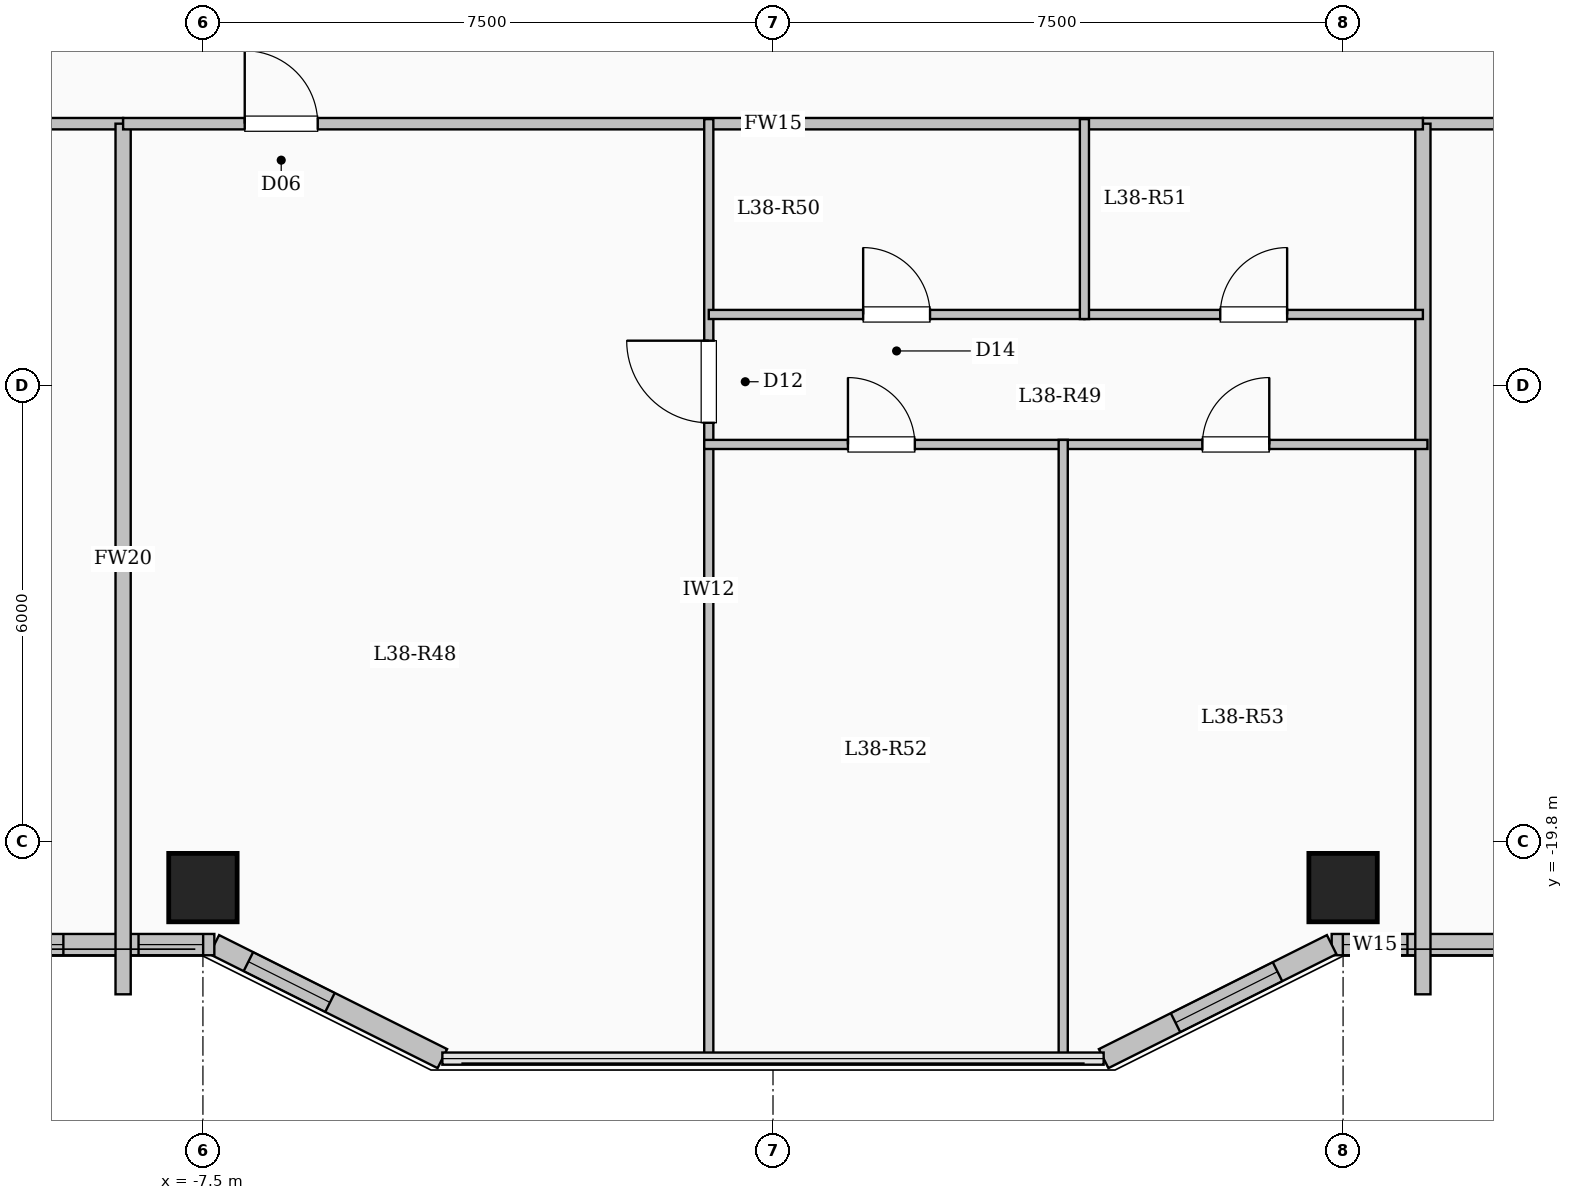
"""IFC4 building model, lengths in metres.
Left out: names, types, materials, properties, quantities, classifications, styles, units other than length and angle.
Written with IfcOpenShell. Run it as: python <this file> out.ifc"""

import sys

from ifc_helpers import new_model, si_unit, direction, frame, frame_2d, origin, origin_2d, place, context, subcontext, project, spatial, rectangle, extrude, element, fill, save


model = new_model("IFC4")
c1 = context("Model", 3, precision=1e-05, world=origin(), true_north=direction((0.0, 1.0)))
c2 = subcontext(c1, "Body", "Model", "MODEL_VIEW")
j1 = project(units=[si_unit("LENGTHUNIT", "METRE"), si_unit("PLANEANGLEUNIT", "RADIAN")], contexts=[c1])
p1 = place(None, origin())
s1 = spatial("IfcSite", under=j1, at=p1, CompositionType="ELEMENT")
p2 = place(p1, origin())
s2 = spatial("IfcBuilding", under=s1, at=p2, CompositionType="ELEMENT")
p3 = place(p2, frame((0.0, 0.0, 142.65)))
s3 = spatial("IfcBuildingStorey", under=s2, at=p3, CompositionType="ELEMENT", Elevation=142.65)
for number, where, z_axis, x_axis in (
    (1, (-7.5, -20.4, 0.0), (0.0, 0.0, 1.0), (1.0, 0.0, 0.0)),
    (2, (7.5, -20.4, 0.0), (0.0, 0.0, 1.0), (1.0, 0.0, 0.0)),
):
    element("IfcColumn", number, at=place(p3, frame(where, z_axis=z_axis, x_axis=x_axis)), inside=s3, PredefinedType="COLUMN", context=c2, shape_type="SweptSolid", body=[
        extrude(rectangle(XDim=0.9, YDim=0.9, at=origin_2d()), origin(), (0.0, 0.0, 1.0), 3.35),
    ])
p4 = place(p3, frame((19.65, -21.15, 0.0), z_axis=(0.0, 0.0, 1.0), x_axis=(-1.0, 0.0, 0.0)))
e3 = element("IfcWall", 3, at=p4, inside=s3, PredefinedType="SOLIDWALL", context=c2, shape_type="SweptSolid", body=[
    extrude(rectangle(XDim=12.3, YDim=0.28, at=frame_2d((6.15, 0.0))), origin(), (0.0, 0.0, 1.0), 3.1),
])
p5 = place(p4, frame((4.321, 0.0, 0.9)))
e4 = element("IfcOpeningElement", 4, at=p5, cuts=e3, PredefinedType="OPENING", context=c2, shape_type="SweptSolid", body=[
    extrude(rectangle(XDim=1.65, YDim=1.6, at=frame_2d((0.825, 0.8))), frame((0.0, 0.15, 0.0), z_axis=(0.0, -1.0, 0.0), x_axis=(1.0, 0.0, 0.0)), (0.0, 0.0, 1.0), 0.3),
])
p6 = place(p4, frame((8.112, 0.0, 0.9)))
e5 = element("IfcOpeningElement", 5, at=p6, cuts=e3, PredefinedType="OPENING", context=c2, shape_type="SweptSolid", body=[
    extrude(rectangle(XDim=2.0, YDim=1.7, at=frame_2d((1.0, 0.85))), frame((0.0, 0.15, 0.0), z_axis=(0.0, -1.0, 0.0), x_axis=(1.0, 0.0, 0.0)), (0.0, 0.0, 1.0), 0.3),
])
p7 = place(p4, frame((11.303, 0.0, 0.95)))
e6 = element("IfcOpeningElement", 6, at=p7, cuts=e3, PredefinedType="OPENING", context=c2, shape_type="SweptSolid", body=[
    extrude(rectangle(XDim=0.85, YDim=1.5, at=frame_2d((0.425, 0.75))), frame((0.0, 0.15, 0.0), z_axis=(0.0, -1.0, 0.0), x_axis=(1.0, 0.0, 0.0)), (0.0, 0.0, 1.0), 0.3),
])
p8 = place(p3, frame((7.35, -21.15, 0.0), z_axis=(0.0, 0.0, 1.0), x_axis=(-0.894427191, -0.4472135955, 0.0)))
e7 = element("IfcWall", 7, at=p8, inside=s3, PredefinedType="SOLIDWALL", context=c2, shape_type="SweptSolid", body=[
    extrude(rectangle(XDim=3.354, YDim=0.28, at=frame_2d((1.677, 0.0))), origin(), (0.0, 0.0, 1.0), 3.1),
])
p9 = place(p8, frame((0.797, 0.0, 0.9)))
e8 = element("IfcOpeningElement", 8, at=p9, cuts=e7, PredefinedType="OPENING", context=c2, shape_type="SweptSolid", body=[
    extrude(rectangle(XDim=1.5, YDim=1.65, at=frame_2d((0.75, 0.825))), frame((0.0, 0.15, 0.0), z_axis=(0.0, -1.0, 0.0), x_axis=(1.0, 0.0, 0.0)), (0.0, 0.0, 1.0), 0.3),
])
p10 = place(p3, frame((-4.35, -22.65, 0.0), z_axis=(0.0, 0.0, 1.0), x_axis=(-0.894427191, 0.4472135955, 0.0)))
e9 = element("IfcWall", 9, at=p10, inside=s3, PredefinedType="SOLIDWALL", context=c2, shape_type="SweptSolid", body=[
    extrude(rectangle(XDim=3.354, YDim=0.28, at=frame_2d((1.677, 0.0))), origin(), (0.0, 0.0, 1.0), 3.1),
])
p11 = place(p10, frame((1.653, 0.0, 0.95)))
e10 = element("IfcOpeningElement", 10, at=p11, cuts=e9, PredefinedType="OPENING", context=c2, shape_type="SweptSolid", body=[
    extrude(rectangle(XDim=1.2, YDim=1.5, at=frame_2d((0.6, 0.75))), frame((0.0, 0.15, 0.0), z_axis=(0.0, -1.0, 0.0), x_axis=(1.0, 0.0, 0.0)), (0.0, 0.0, 1.0), 0.3),
])
p12 = place(p3, frame((-7.35, -21.15, 0.0), z_axis=(0.0, 0.0, 1.0), x_axis=(-1.0, 0.0, 0.0)))
e11 = element("IfcWall", 11, at=p12, inside=s3, PredefinedType="SOLIDWALL", context=c2, shape_type="SweptSolid", body=[
    extrude(rectangle(XDim=12.3, YDim=0.28, at=frame_2d((6.15, 0.0))), origin(), (0.0, 0.0, 1.0), 3.1),
])
p13 = place(p12, frame((0.147, 0.0, 0.95)))
e12 = element("IfcOpeningElement", 12, at=p13, cuts=e11, PredefinedType="OPENING", context=c2, shape_type="SweptSolid", body=[
    extrude(rectangle(XDim=0.85, YDim=1.5, at=frame_2d((0.425, 0.75))), frame((0.0, 0.15, 0.0), z_axis=(0.0, -1.0, 0.0), x_axis=(1.0, 0.0, 0.0)), (0.0, 0.0, 1.0), 0.3),
])
p14 = place(p12, frame((1.986, 0.0, 0.9)))
e13 = element("IfcOpeningElement", 13, at=p14, cuts=e11, PredefinedType="OPENING", context=c2, shape_type="SweptSolid", body=[
    extrude(rectangle(XDim=1.5, YDim=1.65, at=frame_2d((0.75, 0.825))), frame((0.0, 0.15, 0.0), z_axis=(0.0, -1.0, 0.0), x_axis=(1.0, 0.0, 0.0)), (0.0, 0.0, 1.0), 0.3),
])
p15 = place(p12, frame((5.275, 0.0, 0.9)))
e14 = element("IfcOpeningElement", 14, at=p15, cuts=e11, PredefinedType="OPENING", context=c2, shape_type="SweptSolid", body=[
    extrude(rectangle(XDim=2.0, YDim=1.7, at=frame_2d((1.0, 0.85))), frame((0.0, 0.15, 0.0), z_axis=(0.0, -1.0, 0.0), x_axis=(1.0, 0.0, 0.0)), (0.0, 0.0, 1.0), 0.3),
])
p16 = place(p12, frame((9.267, 0.0, 0.9)))
e15 = element("IfcOpeningElement", 15, at=p16, cuts=e11, PredefinedType="OPENING", context=c2, shape_type="SweptSolid", body=[
    extrude(rectangle(XDim=2.0, YDim=1.7, at=frame_2d((1.0, 0.85))), frame((0.0, 0.15, 0.0), z_axis=(0.0, -1.0, 0.0), x_axis=(1.0, 0.0, 0.0)), (0.0, 0.0, 1.0), 0.3),
])
p17 = place(p3, frame((-19.55, -10.35, 0.0), z_axis=(0.0, 0.0, 1.0), x_axis=(1.0, 0.0, 0.0)))
e16 = element("IfcWall", 16, at=p17, inside=s3, PredefinedType="PARTITIONING", context=c2, shape_type="SweptSolid", body=[
    extrude(rectangle(XDim=11.0, YDim=0.15, at=frame_2d((5.5, 0.0))), origin(), (0.0, 0.0, 1.0), 3.1),
])
p18 = place(p17, frame((1.466, 0.0, 0.0)))
e17 = element("IfcOpeningElement", 17, at=p18, cuts=e16, PredefinedType="OPENING", context=c2, shape_type="SweptSolid", body=[
    extrude(rectangle(XDim=0.95, YDim=2.15, at=frame_2d((0.475, 1.075))), frame((0.0, 0.085, 0.0), z_axis=(0.0, -1.0, 0.0), x_axis=(1.0, 0.0, 0.0)), (0.0, 0.0, 1.0), 0.17),
])
p19 = place(p17, frame((5.438, 0.0, 0.0)))
e18 = element("IfcOpeningElement", 18, at=p19, cuts=e16, PredefinedType="OPENING", context=c2, shape_type="SweptSolid", body=[
    extrude(rectangle(XDim=0.95, YDim=2.15, at=frame_2d((0.475, 1.075))), frame((0.0, 0.085, 0.0), z_axis=(0.0, -1.0, 0.0), x_axis=(1.0, 0.0, 0.0)), (0.0, 0.0, 1.0), 0.17),
])
p20 = place(p17, frame((8.972, 0.0, 0.0)))
e19 = element("IfcOpeningElement", 19, at=p20, cuts=e16, PredefinedType="OPENING", context=c2, shape_type="SweptSolid", body=[
    extrude(rectangle(XDim=0.95, YDim=2.15, at=frame_2d((0.475, 1.075))), frame((0.0, 0.085, 0.0), z_axis=(0.0, -1.0, 0.0), x_axis=(1.0, 0.0, 0.0)), (0.0, 0.0, 1.0), 0.17),
])
p21 = place(p3, frame((8.55, -10.35, 0.0), z_axis=(0.0, 0.0, 1.0), x_axis=(1.0, 0.0, 0.0)))
e20 = element("IfcWall", 20, at=p21, inside=s3, PredefinedType="PARTITIONING", context=c2, shape_type="SweptSolid", body=[
    extrude(rectangle(XDim=11.0, YDim=0.15, at=frame_2d((5.5, 0.0))), origin(), (0.0, 0.0, 1.0), 3.1),
])
p22 = place(p21, frame((1.516, 0.0, 0.0)))
e21 = element("IfcOpeningElement", 21, at=p22, cuts=e20, PredefinedType="OPENING", context=c2, shape_type="SweptSolid", body=[
    extrude(rectangle(XDim=0.95, YDim=2.15, at=frame_2d((0.475, 1.075))), frame((0.0, 0.085, 0.0), z_axis=(0.0, -1.0, 0.0), x_axis=(1.0, 0.0, 0.0)), (0.0, 0.0, 1.0), 0.17),
])
p23 = place(p21, frame((5.488, 0.0, 0.0)))
e22 = element("IfcOpeningElement", 22, at=p23, cuts=e20, PredefinedType="OPENING", context=c2, shape_type="SweptSolid", body=[
    extrude(rectangle(XDim=0.95, YDim=2.15, at=frame_2d((0.475, 1.075))), frame((0.0, 0.085, 0.0), z_axis=(0.0, -1.0, 0.0), x_axis=(1.0, 0.0, 0.0)), (0.0, 0.0, 1.0), 0.17),
])
p24 = place(p21, frame((9.022, 0.0, 0.0)))
e23 = element("IfcOpeningElement", 23, at=p24, cuts=e20, PredefinedType="OPENING", context=c2, shape_type="SweptSolid", body=[
    extrude(rectangle(XDim=0.95, YDim=2.15, at=frame_2d((0.475, 1.075))), frame((0.0, 0.085, 0.0), z_axis=(0.0, -1.0, 0.0), x_axis=(1.0, 0.0, 0.0)), (0.0, 0.0, 1.0), 0.17),
])
for number, where, z_axis, x_axis in (
    (24, (-8.55, -21.804, 0.0), (0.0, 0.0, 1.0), (0.0, 1.0, 0.0)),
    (25, (8.55, -21.804, 0.0), (0.0, 0.0, 1.0), (0.0, 1.0, 0.0)),
):
    element("IfcWall", number, at=place(p3, frame(where, z_axis=z_axis, x_axis=x_axis)), inside=s3, PredefinedType="SOLIDWALL", context=c2, shape_type="SweptSolid", body=[
        extrude(rectangle(XDim=11.454, YDim=0.2, at=frame_2d((5.727, 0.0))), origin(), (0.0, 0.0, 1.0), 3.1),
    ])
p25 = place(p3, frame((-8.55, -10.35, 0.0), z_axis=(0.0, 0.0, 1.0), x_axis=(1.0, 0.0, 0.0)))
e26 = element("IfcWall", 26, at=p25, inside=s3, PredefinedType="PARTITIONING", context=c2, shape_type="SweptSolid", body=[
    extrude(rectangle(XDim=17.1, YDim=0.15, at=frame_2d((8.55, 0.0))), origin(), (0.0, 0.0, 1.0), 3.1),
])
p26 = place(p25, frame((1.6, 0.0, 0.0)))
e27 = element("IfcOpeningElement", 27, at=p26, cuts=e26, PredefinedType="OPENING", context=c2, shape_type="SweptSolid", body=[
    extrude(rectangle(XDim=0.96, YDim=2.15, at=frame_2d((0.48, 1.075))), frame((0.0, 0.085, 0.0), z_axis=(0.0, -1.0, 0.0), x_axis=(1.0, 0.0, 0.0)), (0.0, 0.0, 1.0), 0.17),
])
p27 = place(p3, frame((-0.845, -22.68, 0.0), z_axis=(0.0, 0.0, 1.0), x_axis=(0.0, 1.0, 0.0)))
e28 = element("IfcWall", 28, at=p27, inside=s3, PredefinedType="PARTITIONING", context=c2, shape_type="SweptSolid", body=[
    extrude(rectangle(XDim=12.39, YDim=0.12, at=frame_2d((6.195, 0.0))), origin(), (0.0, 0.0, 1.0), 3.1),
])
p28 = place(p27, frame((8.395, 0.0, 0.0)))
e29 = element("IfcOpeningElement", 29, at=p28, cuts=e28, PredefinedType="OPENING", context=c2, shape_type="SweptSolid", body=[
    extrude(rectangle(XDim=1.08, YDim=2.15, at=frame_2d((0.54, 1.075))), frame((0.0, 0.07, 0.0), z_axis=(0.0, -1.0, 0.0), x_axis=(1.0, 0.0, 0.0)), (0.0, 0.0, 1.0), 0.14),
])
p29 = place(p3, frame((-0.845, -12.86, 0.0), z_axis=(0.0, 0.0, 1.0), x_axis=(1.0, 0.0, 0.0)))
e30 = element("IfcWall", 30, at=p29, inside=s3, PredefinedType="PARTITIONING", context=c2, shape_type="SweptSolid", body=[
    extrude(rectangle(XDim=4.942, YDim=0.12, at=frame_2d((2.471, 0.0))), origin(), (0.0, 0.0, 1.0), 3.1),
])
p30 = place(p29, frame((2.031, 0.0, 0.0)))
e31 = element("IfcOpeningElement", 31, at=p30, cuts=e30, PredefinedType="OPENING", context=c2, shape_type="SweptSolid", body=[
    extrude(rectangle(XDim=0.88, YDim=2.1, at=frame_2d((0.44, 1.05))), frame((0.0, 0.07, 0.0), z_axis=(0.0, -1.0, 0.0), x_axis=(1.0, 0.0, 0.0)), (0.0, 0.0, 1.0), 0.14),
])
p31 = place(p3, frame((4.097, -12.86, 0.0), z_axis=(0.0, 0.0, 1.0), x_axis=(1.0, 0.0, 0.0)))
e32 = element("IfcWall", 32, at=p31, inside=s3, PredefinedType="PARTITIONING", context=c2, shape_type="SweptSolid", body=[
    extrude(rectangle(XDim=4.453, YDim=0.12, at=frame_2d((2.227, 0.0))), origin(), (0.0, 0.0, 1.0), 3.1),
])
p32 = place(p31, frame((1.787, 0.0, 0.0)))
e33 = element("IfcOpeningElement", 33, at=p32, cuts=e32, PredefinedType="OPENING", context=c2, shape_type="SweptSolid", body=[
    extrude(rectangle(XDim=0.88, YDim=2.1, at=frame_2d((0.44, 1.05))), frame((0.0, 0.07, 0.0), z_axis=(0.0, -1.0, 0.0), x_axis=(1.0, 0.0, 0.0)), (0.0, 0.0, 1.0), 0.14),
])
p33 = place(p3, frame((-0.905, -14.57, 0.0), z_axis=(0.0, 0.0, 1.0), x_axis=(1.0, 0.0, 0.0)))
e34 = element("IfcWall", 34, at=p33, inside=s3, PredefinedType="PARTITIONING", context=c2, shape_type="SweptSolid", body=[
    extrude(rectangle(XDim=9.515, YDim=0.12, at=frame_2d((4.758, 0.0))), origin(), (0.0, 0.0, 1.0), 3.1),
])
p34 = place(p33, frame((1.891, 0.0, 0.0)))
e35 = element("IfcOpeningElement", 35, at=p34, cuts=e34, PredefinedType="OPENING", context=c2, shape_type="SweptSolid", body=[
    extrude(rectangle(XDim=0.88, YDim=2.1, at=frame_2d((0.44, 1.05))), frame((0.0, 0.07, 0.0), z_axis=(0.0, -1.0, 0.0), x_axis=(1.0, 0.0, 0.0)), (0.0, 0.0, 1.0), 0.14),
])
p35 = place(p33, frame((6.554, 0.0, 0.0)))
e36 = element("IfcOpeningElement", 36, at=p35, cuts=e34, PredefinedType="OPENING", context=c2, shape_type="SweptSolid", body=[
    extrude(rectangle(XDim=0.88, YDim=2.1, at=frame_2d((0.44, 1.05))), frame((0.0, 0.07, 0.0), z_axis=(0.0, -1.0, 0.0), x_axis=(1.0, 0.0, 0.0)), (0.0, 0.0, 1.0), 0.14),
])
p36 = place(p3, frame((4.097, -12.92, 0.0), z_axis=(0.0, 0.0, 1.0), x_axis=(0.0, 1.0, 0.0)))
e37 = element("IfcWall", 37, at=p36, inside=s3, PredefinedType="PARTITIONING", context=c2, shape_type="SweptSolid", body=[
    extrude(rectangle(XDim=2.63, YDim=0.12, at=frame_2d((1.315, 0.0))), origin(), (0.0, 0.0, 1.0), 3.1),
])
p37 = place(p3, frame((3.818, -22.68, 0.0), z_axis=(0.0, 0.0, 1.0), x_axis=(0.0, 1.0, 0.0)))
e38 = element("IfcWall", 38, at=p37, inside=s3, PredefinedType="PARTITIONING", context=c2, shape_type="SweptSolid", body=[
    extrude(rectangle(XDim=8.17, YDim=0.12, at=frame_2d((4.085, 0.0))), origin(), (0.0, 0.0, 1.0), 3.1),
])
p38 = place(p7, origin())
e39 = element("IfcWindow", 39, at=p38, inside=s3, PartitioningType="SINGLE_PANEL", PredefinedType="WINDOW", context=c2, shape_type="SweptSolid", body=[
    extrude(rectangle(XDim=0.85, YDim=1.5, at=frame_2d((0.425, 0.75))), frame((0.0, 0.03, 0.0), z_axis=(0.0, -1.0, 0.0), x_axis=(1.0, 0.0, 0.0)), (0.0, 0.0, 1.0), 0.06),
])
fill(e6, e39)
p39 = place(p9, origin())
e40 = element("IfcWindow", 40, at=p39, inside=s3, PartitioningType="SINGLE_PANEL", PredefinedType="WINDOW", context=c2, shape_type="SweptSolid", body=[
    extrude(rectangle(XDim=1.5, YDim=1.65, at=frame_2d((0.75, 0.825))), frame((0.0, 0.03, 0.0), z_axis=(0.0, -1.0, 0.0), x_axis=(1.0, 0.0, 0.0)), (0.0, 0.0, 1.0), 0.06),
])
fill(e8, e40)
p40 = place(p11, origin())
e41 = element("IfcWindow", 41, at=p40, inside=s3, PartitioningType="SINGLE_PANEL", PredefinedType="WINDOW", context=c2, shape_type="SweptSolid", body=[
    extrude(rectangle(XDim=1.2, YDim=1.5, at=frame_2d((0.6, 0.75))), frame((0.0, 0.03, 0.0), z_axis=(0.0, -1.0, 0.0), x_axis=(1.0, 0.0, 0.0)), (0.0, 0.0, 1.0), 0.06),
])
fill(e10, e41)
p41 = place(p13, origin())
e42 = element("IfcWindow", 42, at=p41, inside=s3, PartitioningType="SINGLE_PANEL", PredefinedType="WINDOW", context=c2, shape_type="SweptSolid", body=[
    extrude(rectangle(XDim=0.85, YDim=1.5, at=frame_2d((0.425, 0.75))), frame((0.0, 0.03, 0.0), z_axis=(0.0, -1.0, 0.0), x_axis=(1.0, 0.0, 0.0)), (0.0, 0.0, 1.0), 0.06),
])
fill(e12, e42)
p42 = place(p14, origin())
e43 = element("IfcWindow", 43, at=p42, inside=s3, PartitioningType="SINGLE_PANEL", PredefinedType="WINDOW", context=c2, shape_type="SweptSolid", body=[
    extrude(rectangle(XDim=1.5, YDim=1.65, at=frame_2d((0.75, 0.825))), frame((0.0, 0.03, 0.0), z_axis=(0.0, -1.0, 0.0), x_axis=(1.0, 0.0, 0.0)), (0.0, 0.0, 1.0), 0.06),
])
fill(e13, e43)
p43 = place(p26, origin())
e44 = element("IfcDoor", 44, at=p43, inside=s3, OperationType="SINGLE_SWING_LEFT", PredefinedType="DOOR", context=c2, shape_type="SweptSolid", body=[
    extrude(rectangle(XDim=0.96, YDim=2.15, at=frame_2d((0.48, 1.075))), frame((0.0, 0.025, 0.0), z_axis=(0.0, -1.0, 0.0), x_axis=(1.0, 0.0, 0.0)), (0.0, 0.0, 1.0), 0.05),
])
fill(e27, e44)
p44 = place(p28, origin())
e45 = element("IfcDoor", 45, at=p44, inside=s3, OperationType="SINGLE_SWING_RIGHT", PredefinedType="DOOR", context=c2, shape_type="SweptSolid", body=[
    extrude(rectangle(XDim=1.08, YDim=2.15, at=frame_2d((0.54, 1.075))), frame((0.0, 0.025, 0.0), z_axis=(0.0, -1.0, 0.0), x_axis=(1.0, 0.0, 0.0)), (0.0, 0.0, 1.0), 0.05),
])
fill(e29, e45)
p45 = place(p30, origin())
e46 = element("IfcDoor", 46, at=p45, inside=s3, OperationType="SINGLE_SWING_LEFT", PredefinedType="DOOR", context=c2, shape_type="SweptSolid", body=[
    extrude(rectangle(XDim=0.88, YDim=2.1, at=frame_2d((0.44, 1.05))), frame((0.0, 0.025, 0.0), z_axis=(0.0, -1.0, 0.0), x_axis=(1.0, 0.0, 0.0)), (0.0, 0.0, 1.0), 0.05),
])
fill(e31, e46)
p46 = place(p32, origin())
e47 = element("IfcDoor", 47, at=p46, inside=s3, OperationType="SINGLE_SWING_RIGHT", PredefinedType="DOOR", context=c2, shape_type="SweptSolid", body=[
    extrude(rectangle(XDim=0.88, YDim=2.1, at=frame_2d((0.44, 1.05))), frame((0.0, 0.025, 0.0), z_axis=(0.0, -1.0, 0.0), x_axis=(1.0, 0.0, 0.0)), (0.0, 0.0, 1.0), 0.05),
])
fill(e33, e47)
p47 = place(p34, origin())
e48 = element("IfcDoor", 48, at=p47, inside=s3, OperationType="SINGLE_SWING_LEFT", PredefinedType="DOOR", context=c2, shape_type="SweptSolid", body=[
    extrude(rectangle(XDim=0.88, YDim=2.1, at=frame_2d((0.44, 1.05))), frame((0.0, 0.025, 0.0), z_axis=(0.0, -1.0, 0.0), x_axis=(1.0, 0.0, 0.0)), (0.0, 0.0, 1.0), 0.05),
])
fill(e35, e48)
p48 = place(p35, origin())
e49 = element("IfcDoor", 49, at=p48, inside=s3, OperationType="SINGLE_SWING_RIGHT", PredefinedType="DOOR", context=c2, shape_type="SweptSolid", body=[
    extrude(rectangle(XDim=0.88, YDim=2.1, at=frame_2d((0.44, 1.05))), frame((0.0, 0.025, 0.0), z_axis=(0.0, -1.0, 0.0), x_axis=(1.0, 0.0, 0.0)), (0.0, 0.0, 1.0), 0.05),
])
fill(e36, e49)
save(model, sys.argv[1])
